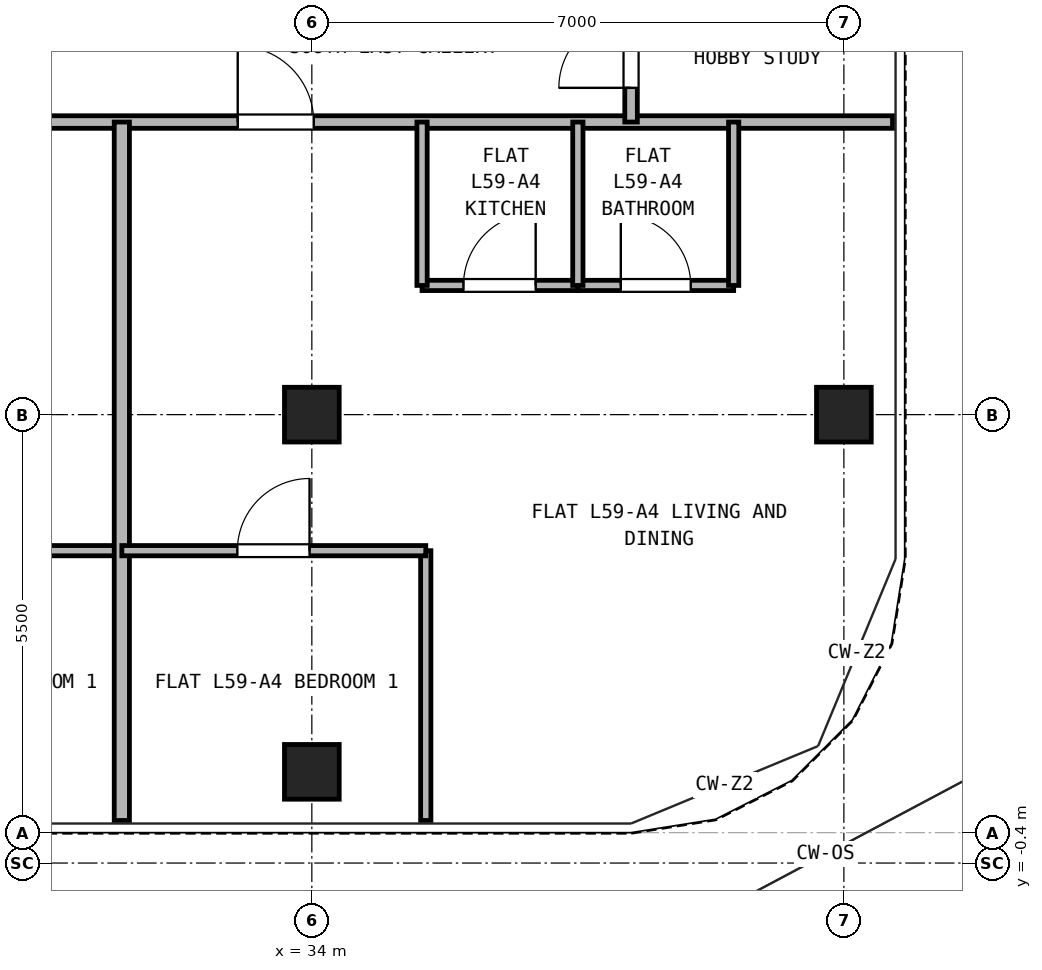
"""IFC4 building model, lengths in metres.
Left out: names, types, materials, properties, quantities, classifications, styles, units other than length and angle.
Written with IfcOpenShell. Run it as: python <this file> out.ifc"""

import sys

from ifc_helpers import new_model, si_unit, direction, frame, frame_2d, origin, origin_2d, place, context, subcontext, project, spatial, rectangle, hollow_rectangle, extrude, source, transform, mapped, element, fill, save


model = new_model("IFC4")
c1 = context("Model", 3, precision=1e-05, world=origin(), true_north=direction((0.0, 1.0)))
c2 = subcontext(c1, "Body", "Model", "MODEL_VIEW")
j1 = project(units=[si_unit("LENGTHUNIT", "METRE"), si_unit("PLANEANGLEUNIT", "RADIAN")], contexts=[c1])
p1 = place(None, origin())
s1 = spatial("IfcSite", under=j1, at=p1, CompositionType="ELEMENT")
p2 = place(p1, origin())
s2 = spatial("IfcBuilding", under=s1, at=p2, CompositionType="ELEMENT")
p3 = place(p2, frame((0.0, 0.0, 209.2)))
s3 = spatial("IfcBuildingStorey", under=s2, at=p3, CompositionType="ELEMENT", Elevation=209.2)
m1 = source(origin(), c2, "Body", "SweptSolid", [
    extrude(hollow_rectangle(XDim=0.72, YDim=0.72, WallThickness=0.04, at=origin_2d()), origin(), (0.0, 0.0, 1.0), 2.95),
])
for number, where, z_axis, x_axis in (
    (1, (34.0, 0.8, 0.0), (0.0, 0.0, 1.0), (1.0, 0.0, 0.0)),
    (2, (41.0, 5.5, 0.0), (0.0, 0.0, 1.0), (1.0, 0.0, 0.0)),
    (3, (34.0, 5.5, 0.0), (0.0, 0.0, 1.0), (1.0, 0.0, 0.0)),
):
    element("IfcColumn", number, at=place(p3, frame(where, z_axis=z_axis, x_axis=x_axis)), inside=s3, PredefinedType="COLUMN", context=c2, shape_type="MappedRepresentation", body=[
        mapped(m1, transform((0.0, 0.0, 0.0), x_axis=(1.0, 0.0, 0.0), y_axis=(0.0, 1.0, 0.0), z_axis=(0.0, 0.0, 1.0), scale=1.0)),
    ])
p4 = place(p3, frame((0.16, 9.35, 0.0), z_axis=(0.0, 0.0, 1.0), x_axis=(1.0, 0.0, 0.0)))
e4 = element("IfcWall", 4, at=p4, inside=s3, PredefinedType="PARTITIONING", context=c2, shape_type="SweptSolid", body=[
    extrude(rectangle(XDim=41.48, YDim=0.165, at=frame_2d((20.74, 0.0))), origin(), (0.0, 0.0, 1.0), 2.95),
])
p5 = place(p4, frame((9.64, 0.0, 0.0)))
e5 = element("IfcOpeningElement", 5, at=p5, cuts=e4, PredefinedType="OPENING", context=c2, shape_type="SweptSolid", body=[
    extrude(rectangle(XDim=1.0, YDim=2.15, at=frame_2d((0.5, 1.075))), frame((0.0, 0.093, 0.0), z_axis=(0.0, -1.0, 0.0), x_axis=(1.0, 0.0, 0.0)), (0.0, 0.0, 1.0), 0.185),
])
p6 = place(p4, frame((19.09, 0.0, 0.0)))
e6 = element("IfcOpeningElement", 6, at=p6, cuts=e4, PredefinedType="OPENING", context=c2, shape_type="SweptSolid", body=[
    extrude(rectangle(XDim=1.0, YDim=2.15, at=frame_2d((0.5, 1.075))), frame((0.0, 0.093, 0.0), z_axis=(0.0, -1.0, 0.0), x_axis=(1.0, 0.0, 0.0)), (0.0, 0.0, 1.0), 0.185),
])
p7 = place(p4, frame((28.34, 0.0, 0.0)))
e7 = element("IfcOpeningElement", 7, at=p7, cuts=e4, PredefinedType="OPENING", context=c2, shape_type="SweptSolid", body=[
    extrude(rectangle(XDim=1.0, YDim=2.15, at=frame_2d((0.5, 1.075))), frame((0.0, 0.093, 0.0), z_axis=(0.0, -1.0, 0.0), x_axis=(1.0, 0.0, 0.0)), (0.0, 0.0, 1.0), 0.185),
])
p8 = place(p4, frame((32.865, 0.0, 0.0)))
e8 = element("IfcOpeningElement", 8, at=p8, cuts=e4, PredefinedType="OPENING", context=c2, shape_type="SweptSolid", body=[
    extrude(rectangle(XDim=1.0, YDim=2.15, at=frame_2d((0.5, 1.075))), frame((0.0, 0.093, 0.0), z_axis=(0.0, -1.0, 0.0), x_axis=(1.0, 0.0, 0.0)), (0.0, 0.0, 1.0), 0.185),
])
p9 = place(p3, frame((38.2, 9.35, 0.0), z_axis=(0.0, 0.0, 1.0), x_axis=(0.0, 1.0, 0.0)))
e9 = element("IfcWall", 9, at=p9, inside=s3, PredefinedType="PARTITIONING", context=c2, shape_type="SweptSolid", body=[
    extrude(rectangle(XDim=2.0, YDim=0.165, at=frame_2d((1.0, 0.0))), origin(), (0.0, 0.0, 1.0), 2.95),
])
p10 = place(p9, frame((0.45, 0.0, 0.0)))
e10 = element("IfcOpeningElement", 10, at=p10, cuts=e9, PredefinedType="OPENING", context=c2, shape_type="SweptSolid", body=[
    extrude(rectangle(XDim=0.95, YDim=2.15, at=frame_2d((0.475, 1.075))), frame((0.0, 0.093, 0.0), z_axis=(0.0, -1.0, 0.0), x_axis=(1.0, 0.0, 0.0)), (0.0, 0.0, 1.0), 0.185),
])
p11 = place(p3, frame((27.656, 3.71, 0.0), z_axis=(0.0, 0.0, 1.0), x_axis=(1.0, 0.0, 0.0)))
e11 = element("IfcWall", 11, at=p11, inside=s3, PredefinedType="PARTITIONING", context=c2, shape_type="SweptSolid", body=[
    extrude(rectangle(XDim=3.844, YDim=0.135, at=frame_2d((1.922, 0.0))), origin(), (0.0, 0.0, 1.0), 2.95),
])
p12 = place(p11, frame((1.442, 0.0, 0.0)))
e12 = element("IfcOpeningElement", 12, at=p12, cuts=e11, PredefinedType="OPENING", context=c2, shape_type="SweptSolid", body=[
    extrude(rectangle(XDim=0.95, YDim=2.15, at=frame_2d((0.475, 1.075))), frame((0.0, 0.077, 0.0), z_axis=(0.0, -1.0, 0.0), x_axis=(1.0, 0.0, 0.0)), (0.0, 0.0, 1.0), 0.155),
])
p13 = place(p3, frame((31.5, 0.16, 0.0), z_axis=(0.0, 0.0, 1.0), x_axis=(0.0, 1.0, 0.0)))
e13 = element("IfcWall", 13, at=p13, inside=s3, PredefinedType="PARTITIONING", context=c2, shape_type="SweptSolid", body=[
    extrude(rectangle(XDim=9.19, YDim=0.2, at=frame_2d((4.595, 0.0))), origin(), (0.0, 0.0, 1.0), 2.95),
])
p14 = place(p3, frame((35.45, 7.2, 0.0), z_axis=(0.0, 0.0, 1.0), x_axis=(1.0, 0.0, 0.0)))
e14 = element("IfcWall", 14, at=p14, inside=s3, PredefinedType="PARTITIONING", context=c2, shape_type="SweptSolid", body=[
    extrude(rectangle(XDim=2.05, YDim=0.135, at=frame_2d((1.025, 0.0))), origin(), (0.0, 0.0, 1.0), 2.95),
])
p15 = place(p14, frame((0.545, 0.0, 0.0)))
e15 = element("IfcOpeningElement", 15, at=p15, cuts=e14, PredefinedType="OPENING", context=c2, shape_type="SweptSolid", body=[
    extrude(rectangle(XDim=0.95, YDim=2.15, at=frame_2d((0.475, 1.075))), frame((0.0, 0.077, 0.0), z_axis=(0.0, -1.0, 0.0), x_axis=(1.0, 0.0, 0.0)), (0.0, 0.0, 1.0), 0.155),
])
p16 = place(p3, frame((37.5, 7.2, 0.0), z_axis=(0.0, 0.0, 1.0), x_axis=(1.0, 0.0, 0.0)))
e16 = element("IfcWall", 16, at=p16, inside=s3, PredefinedType="PARTITIONING", context=c2, shape_type="SweptSolid", body=[
    extrude(rectangle(XDim=2.05, YDim=0.135, at=frame_2d((1.025, 0.0))), origin(), (0.0, 0.0, 1.0), 2.95),
])
p17 = place(p16, frame((0.565, 0.0, 0.0)))
e17 = element("IfcOpeningElement", 17, at=p17, cuts=e16, PredefinedType="OPENING", context=c2, shape_type="SweptSolid", body=[
    extrude(rectangle(XDim=0.92, YDim=2.1, at=frame_2d((0.46, 1.05))), frame((0.0, 0.077, 0.0), z_axis=(0.0, -1.0, 0.0), x_axis=(1.0, 0.0, 0.0)), (0.0, 0.0, 1.0), 0.155),
])
for number, where, z_axis, x_axis in (
    (18, (35.45, 7.2, 0.0), (0.0, 0.0, 1.0), (0.0, 1.0, 0.0)),
    (19, (37.5, 7.2, 0.0), (0.0, 0.0, 1.0), (0.0, 1.0, 0.0)),
    (20, (39.55, 7.2, 0.0), (0.0, 0.0, 1.0), (0.0, 1.0, 0.0)),
):
    element("IfcWall", number, at=place(p3, frame(where, z_axis=z_axis, x_axis=x_axis)), inside=s3, PredefinedType="PARTITIONING", context=c2, shape_type="SweptSolid", body=[
        extrude(rectangle(XDim=2.15, YDim=0.135, at=frame_2d((1.075, 0.0))), origin(), (0.0, 0.0, 1.0), 2.95),
    ])
p18 = place(p3, frame((35.499, 0.16, 0.0), z_axis=(0.0, 0.0, 1.0), x_axis=(0.0, 1.0, 0.0)))
e21 = element("IfcWall", 21, at=p18, inside=s3, PredefinedType="PARTITIONING", context=c2, shape_type="SweptSolid", body=[
    extrude(rectangle(XDim=3.55, YDim=0.135, at=frame_2d((1.775, 0.0))), origin(), (0.0, 0.0, 1.0), 2.95),
])
p19 = place(p3, frame((31.5, 3.71, 0.0), z_axis=(0.0, 0.0, 1.0), x_axis=(1.0, 0.0, 0.0)))
e22 = element("IfcWall", 22, at=p19, inside=s3, PredefinedType="PARTITIONING", context=c2, shape_type="SweptSolid", body=[
    extrude(rectangle(XDim=3.999, YDim=0.135, at=frame_2d((2.0, 0.0))), origin(), (0.0, 0.0, 1.0), 2.95),
])
p20 = place(p19, frame((1.52, 0.0, 0.0)))
e23 = element("IfcOpeningElement", 23, at=p20, cuts=e22, PredefinedType="OPENING", context=c2, shape_type="SweptSolid", body=[
    extrude(rectangle(XDim=0.95, YDim=2.15, at=frame_2d((0.475, 1.075))), frame((0.0, 0.077, 0.0), z_axis=(0.0, -1.0, 0.0), x_axis=(1.0, 0.0, 0.0)), (0.0, 0.0, 1.0), 0.155),
])
p21 = place(p15, origin())
e24 = element("IfcDoor", 24, at=p21, inside=s3, OperationType="SINGLE_SWING_RIGHT", PredefinedType="DOOR", context=c2, shape_type="SweptSolid", body=[
    extrude(rectangle(XDim=0.95, YDim=2.15, at=frame_2d((0.475, 1.075))), frame((0.0, 0.025, 0.0), z_axis=(0.0, -1.0, 0.0), x_axis=(1.0, 0.0, 0.0)), (0.0, 0.0, 1.0), 0.05),
])
fill(e15, e24)
p22 = place(p17, origin())
e25 = element("IfcDoor", 25, at=p22, inside=s3, OperationType="SINGLE_SWING_LEFT", PredefinedType="DOOR", context=c2, shape_type="SweptSolid", body=[
    extrude(rectangle(XDim=0.92, YDim=2.1, at=frame_2d((0.46, 1.05))), frame((0.0, 0.025, 0.0), z_axis=(0.0, -1.0, 0.0), x_axis=(1.0, 0.0, 0.0)), (0.0, 0.0, 1.0), 0.05),
])
fill(e17, e25)
p23 = place(p20, frame((0.95, 0.0, 0.0), z_axis=(0.0, 0.0, 1.0), x_axis=(-1.0, 0.0, 0.0)))
e26 = element("IfcDoor", 26, at=p23, inside=s3, OperationType="SINGLE_SWING_RIGHT", PredefinedType="DOOR", context=c2, shape_type="SweptSolid", body=[
    extrude(rectangle(XDim=0.95, YDim=2.15, at=frame_2d((0.475, 1.075))), frame((0.0, 0.025, 0.0), z_axis=(0.0, -1.0, 0.0), x_axis=(1.0, 0.0, 0.0)), (0.0, 0.0, 1.0), 0.05),
])
fill(e23, e26)
p24 = place(p8, frame((1.0, 0.0, 0.0), z_axis=(0.0, 0.0, 1.0), x_axis=(-1.0, 0.0, 0.0)))
e27 = element("IfcDoor", 27, at=p24, inside=s3, OperationType="SINGLE_SWING_LEFT", PredefinedType="DOOR", context=c2, shape_type="SweptSolid", body=[
    extrude(rectangle(XDim=1.0, YDim=2.15, at=frame_2d((0.5, 1.075))), frame((0.0, 0.025, 0.0), z_axis=(0.0, -1.0, 0.0), x_axis=(1.0, 0.0, 0.0)), (0.0, 0.0, 1.0), 0.05),
])
fill(e8, e27)
p25 = place(p10, origin())
e28 = element("IfcDoor", 28, at=p25, inside=s3, OperationType="SINGLE_SWING_LEFT", PredefinedType="DOOR", context=c2, shape_type="SweptSolid", body=[
    extrude(rectangle(XDim=0.95, YDim=2.15, at=frame_2d((0.475, 1.075))), frame((0.0, 0.025, 0.0), z_axis=(0.0, -1.0, 0.0), x_axis=(1.0, 0.0, 0.0)), (0.0, 0.0, 1.0), 0.05),
])
fill(e10, e28)
save(model, sys.argv[1])
